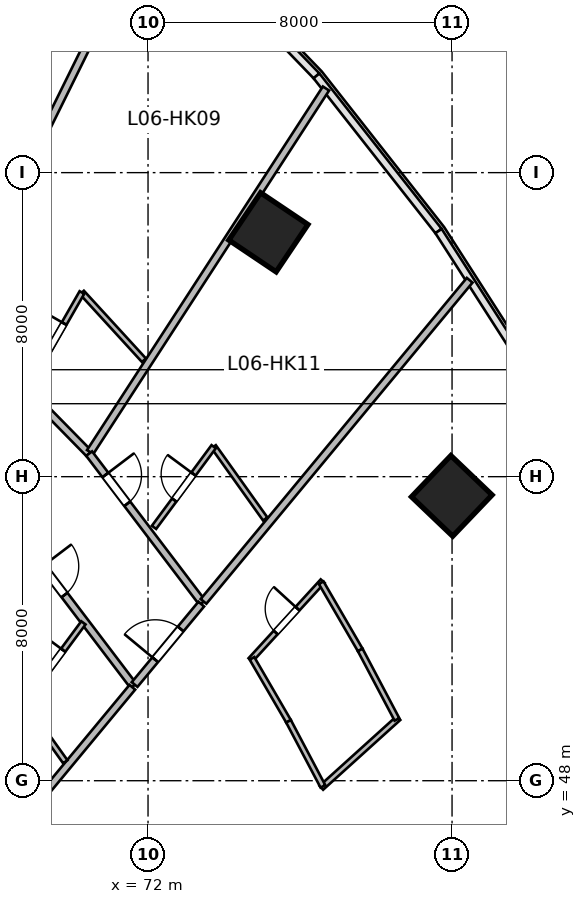
"""IFC4 building model, lengths in metres.
Left out: names, types, materials, properties, quantities, classifications, styles, units other than length and angle.
Written with IfcOpenShell. Run it as: python <this file> out.ifc"""

import sys

from ifc_helpers import new_model, si_unit, direction, frame, frame_2d, origin, origin_2d, place, context, subcontext, project, spatial, rectangle, extrude, source, transform, mapped, element, fill, save


model = new_model("IFC4")
c1 = context("Model", 3, precision=1e-05, world=origin(), true_north=direction((0.0, 1.0)))
c2 = subcontext(c1, "Body", "Model", "MODEL_VIEW")
j1 = project(units=[si_unit("LENGTHUNIT", "METRE"), si_unit("PLANEANGLEUNIT", "RADIAN")], contexts=[c1])
p1 = place(None, origin())
s1 = spatial("IfcSite", under=j1, at=p1, CompositionType="ELEMENT")
p2 = place(p1, origin())
s2 = spatial("IfcBuilding", under=s1, at=p2, CompositionType="ELEMENT")
p3 = place(p2, frame((0.0, 0.0, 35.4)))
s3 = spatial("IfcBuildingStorey", under=s2, at=p3, CompositionType="ELEMENT", Elevation=35.4)
m1 = source(origin(), c2, "Body", "SweptSolid", [
    extrude(rectangle(XDim=1.5, YDim=1.5, at=origin_2d()), origin(), (0.0, 0.0, 1.0), 3.6),
])
for number, where, z_axis, x_axis in (
    (1, (75.167, 62.43, 0.0), (0.0, 0.0, 1.0), (0.558, 0.83, 0.0)),
    (2, (79.993, 55.494, 0.0), (0.0, 0.0, 1.0), (0.691, 0.723, 0.0)),
):
    element("IfcColumn", number, at=place(p3, frame(where, z_axis=z_axis, x_axis=x_axis)), inside=s3, PredefinedType="COLUMN", context=c2, shape_type="MappedRepresentation", body=[
        mapped(m1, transform((0.0, 0.0, 0.0), scale=1.0)),
    ])
m2 = source(origin(), c2, "Body", "SweptSolid", [
    extrude(rectangle(XDim=11.77, YDim=0.195, at=frame_2d((5.885, 0.0))), origin(), (0.0, 0.0, 1.0), 3.36),
])
p4 = place(p3, frame((66.909, 60.282, 0.0), z_axis=(0.0, 0.0, 1.0), x_axis=(0.44286060326, 0.896590478468, 0.0)))
e3 = element("IfcWall", 3, at=p4, inside=s3, PredefinedType="PARTITIONING", context=c2, shape_type="MappedRepresentation", body=[
    mapped(m2, transform((0.0, 0.0, 0.0), scale=1.0)),
])
m3 = source(origin(), c2, "Body", "SweptSolid", [
    extrude(rectangle(XDim=5.087, YDim=0.195, at=frame_2d((2.543, 0.0))), origin(), (0.0, 0.0, 1.0), 3.36),
])
p5 = place(p3, frame((66.887, 60.238, 0.0), z_axis=(0.0, 0.0, 1.0), x_axis=(0.700428330775, -0.7137227427, 0.0)))
e4 = element("IfcWall", 4, at=p5, inside=s3, PredefinedType="PARTITIONING", context=c2, shape_type="MappedRepresentation", body=[
    mapped(m3, transform((0.0, 0.0, 0.0), scale=1.0)),
])
p6 = place(p5, frame((0.746, 0.0, 0.0)))
e5 = element("IfcOpeningElement", 5, at=p6, cuts=e4, PredefinedType="OPENING", context=c2, shape_type="SweptSolid", body=[
    extrude(rectangle(XDim=0.95, YDim=2.15, at=frame_2d((0.475, 1.075))), frame((0.0, 0.107, 0.0), z_axis=(0.0, -1.0, 0.0), x_axis=(1.0, 0.0, 0.0)), (0.0, 0.0, 1.0), 0.215),
])
m4 = source(origin(), c2, "Body", "SweptSolid", [
    extrude(rectangle(XDim=11.403, YDim=0.195, at=frame_2d((5.701, 0.0))), origin(), (0.0, 0.0, 1.0), 3.36),
])
p7 = place(p3, frame((70.477, 56.647, 0.0), z_axis=(0.0, 0.0, 1.0), x_axis=(0.544246090008, 0.838925618581, 0.0)))
e6 = element("IfcWall", 6, at=p7, inside=s3, PredefinedType="PARTITIONING", context=c2, shape_type="MappedRepresentation", body=[
    mapped(m4, transform((0.0, 0.0, 0.0), scale=1.0)),
])
m5 = source(origin(), c2, "Body", "SweptSolid", [
    extrude(rectangle(XDim=2.416, YDim=0.14, at=frame_2d((1.208, 0.0))), origin(), (0.0, 0.0, 1.0), 3.36),
])
p8 = place(p3, frame((70.26, 60.846, 0.0), z_axis=(0.0, 0.0, 1.0), x_axis=(0.675399637907, -0.737451916476, 0.0)))
e7 = element("IfcWall", 7, at=p8, inside=s3, PredefinedType="PARTITIONING", context=c2, shape_type="MappedRepresentation", body=[
    mapped(m5, transform((0.0, 0.0, 0.0), scale=1.0)),
])
m6 = source(origin(), c2, "Body", "SweptSolid", [
    extrude(rectangle(XDim=2.732, YDim=0.14, at=frame_2d((1.366, 0.0))), origin(), (0.0, 0.0, 1.0), 3.36),
])
p9 = place(p3, frame((68.902, 58.476, 0.0), z_axis=(0.0, 0.0, 1.0), x_axis=(0.497254966372, 0.867604459658, 0.0)))
e8 = element("IfcWall", 8, at=p9, inside=s3, PredefinedType="PARTITIONING", context=c2, shape_type="MappedRepresentation", body=[
    mapped(m6, transform((0.0, 0.0, 0.0), scale=1.0)),
])
p10 = place(p9, frame((0.941, 0.0, 0.0)))
e9 = element("IfcOpeningElement", 9, at=p10, cuts=e8, PredefinedType="OPENING", context=c2, shape_type="SweptSolid", body=[
    extrude(rectangle(XDim=0.85, YDim=2.05, at=frame_2d((0.425, 1.025))), frame((0.0, 0.08, 0.0), z_axis=(0.0, -1.0, 0.0), x_axis=(1.0, 0.0, 0.0)), (0.0, 0.0, 1.0), 0.16),
])
m7 = source(origin(), c2, "Body", "SweptSolid", [
    extrude(rectangle(XDim=4.928, YDim=0.195, at=frame_2d((2.464, 0.0))), origin(), (0.0, 0.0, 1.0), 3.36),
])
p11 = place(p3, frame((70.45, 56.607, 0.0), z_axis=(0.0, 0.0, 1.0), x_axis=(0.604793043708, -0.796382680803, 0.0)))
e10 = element("IfcWall", 10, at=p11, inside=s3, PredefinedType="PARTITIONING", context=c2, shape_type="MappedRepresentation", body=[
    mapped(m7, transform((0.0, 0.0, 0.0), scale=1.0)),
])
p12 = place(p11, frame((0.708, 0.0, 0.0)))
e11 = element("IfcOpeningElement", 11, at=p12, cuts=e10, PredefinedType="OPENING", context=c2, shape_type="SweptSolid", body=[
    extrude(rectangle(XDim=0.95, YDim=2.15, at=frame_2d((0.475, 1.075))), frame((0.0, 0.107, 0.0), z_axis=(0.0, -1.0, 0.0), x_axis=(1.0, 0.0, 0.0)), (0.0, 0.0, 1.0), 0.215),
])
m8 = source(origin(), c2, "Body", "SweptSolid", [
    extrude(rectangle(XDim=10.975, YDim=0.195, at=frame_2d((5.487, 0.0))), origin(), (0.0, 0.0, 1.0), 3.36),
])
p13 = place(p3, frame((73.46, 52.719, 0.0), z_axis=(0.0, 0.0, 1.0), x_axis=(0.638125265812, 0.769932558821, 0.0)))
e12 = element("IfcWall", 12, at=p13, inside=s3, PredefinedType="PARTITIONING", context=c2, shape_type="MappedRepresentation", body=[
    mapped(m8, transform((0.0, 0.0, 0.0), scale=1.0)),
])
m9 = source(origin(), c2, "Body", "SweptSolid", [
    extrude(rectangle(XDim=2.337, YDim=0.14, at=frame_2d((1.169, 0.0))), origin(), (0.0, 0.0, 1.0), 3.36),
])
p14 = place(p3, frame((73.727, 56.789, 0.0), z_axis=(0.0, 0.0, 1.0), x_axis=(0.580862665959, -0.814001574504, 0.0)))
e13 = element("IfcWall", 13, at=p14, inside=s3, PredefinedType="PARTITIONING", context=c2, shape_type="MappedRepresentation", body=[
    mapped(m9, transform((0.0, 0.0, 0.0), scale=1.0)),
])
m10 = source(origin(), c2, "Body", "SweptSolid", [
    extrude(rectangle(XDim=2.64, YDim=0.14, at=frame_2d((1.32, 0.0))), origin(), (0.0, 0.0, 1.0), 3.36),
])
p15 = place(p3, frame((72.157, 54.666, 0.0), z_axis=(0.0, 0.0, 1.0), x_axis=(0.594630255283, 0.803999290735, 0.0)))
e14 = element("IfcWall", 14, at=p15, inside=s3, PredefinedType="PARTITIONING", context=c2, shape_type="MappedRepresentation", body=[
    mapped(m10, transform((0.0, 0.0, 0.0), scale=1.0)),
])
p16 = place(p15, frame((0.895, 0.0, 0.0)))
e15 = element("IfcOpeningElement", 15, at=p16, cuts=e14, PredefinedType="OPENING", context=c2, shape_type="SweptSolid", body=[
    extrude(rectangle(XDim=0.85, YDim=2.05, at=frame_2d((0.425, 1.025))), frame((0.0, 0.08, 0.0), z_axis=(0.0, -1.0, 0.0), x_axis=(1.0, 0.0, 0.0)), (0.0, 0.0, 1.0), 0.16),
])
m11 = source(origin(), c2, "Body", "SweptSolid", [
    extrude(rectangle(XDim=4.576, YDim=0.195, at=frame_2d((2.288, 0.0))), origin(), (0.0, 0.0, 1.0), 3.36),
])
p17 = place(p3, frame((68.85, 54.139, 0.0), z_axis=(0.0, 0.0, 1.0), x_axis=(0.604795096156, -0.796381122118, 0.0)))
e16 = element("IfcWall", 16, at=p17, inside=s3, PredefinedType="PARTITIONING", context=c2, shape_type="MappedRepresentation", body=[
    mapped(m11, transform((0.0, 0.0, 0.0), scale=1.0)),
])
p18 = place(p17, frame((0.623, 0.0, 0.0)))
e17 = element("IfcOpeningElement", 17, at=p18, cuts=e16, PredefinedType="OPENING", context=c2, shape_type="SweptSolid", body=[
    extrude(rectangle(XDim=0.95, YDim=2.15, at=frame_2d((0.475, 1.075))), frame((0.0, 0.107, 0.0), z_axis=(0.0, -1.0, 0.0), x_axis=(1.0, 0.0, 0.0)), (0.0, 0.0, 1.0), 0.215),
])
m12 = source(origin(), c2, "Body", "SweptSolid", [
    extrude(rectangle(XDim=11.053, YDim=0.195, at=frame_2d((5.527, 0.0))), origin(), (0.0, 0.0, 1.0), 3.36),
])
p19 = place(p3, frame((64.534, 41.949, 0.0), z_axis=(0.0, 0.0, 1.0), x_axis=(0.638131235571, 0.769927611005, 0.0)))
e18 = element("IfcWall", 18, at=p19, inside=s3, PredefinedType="PARTITIONING", context=c2, shape_type="MappedRepresentation", body=[
    mapped(m12, transform((0.0, 0.0, 0.0), scale=1.0)),
])
m13 = source(origin(), c2, "Body", "SweptSolid", [
    extrude(rectangle(XDim=1.884, YDim=0.14, at=frame_2d((0.942, 0.0))), origin(), (0.0, 0.0, 1.0), 3.36),
])
p20 = place(p3, frame((68.729, 50.031, 0.0), z_axis=(0.0, 0.0, 1.0), x_axis=(0.580833492897, -0.814022391295, 0.0)))
e19 = element("IfcWall", 19, at=p20, inside=s3, PredefinedType="PARTITIONING", context=c2, shape_type="MappedRepresentation", body=[
    mapped(m13, transform((0.0, 0.0, 0.0), scale=1.0)),
])
p21 = place(p3, frame((68.729, 50.031, 0.0), z_axis=(0.0, 0.0, 1.0), x_axis=(0.594674469522, 0.803966588422, 0.0)))
e20 = element("IfcWall", 20, at=p21, inside=s3, PredefinedType="PARTITIONING", context=c2, shape_type="MappedRepresentation", body=[
    mapped(m10, transform((0.0, 0.0, 0.0), scale=1.0)),
])
p22 = place(p21, frame((0.895, 0.0, 0.0)))
e21 = element("IfcOpeningElement", 21, at=p22, cuts=e20, PredefinedType="OPENING", context=c2, shape_type="SweptSolid", body=[
    extrude(rectangle(XDim=0.85, YDim=2.05, at=frame_2d((0.425, 1.025))), frame((0.0, 0.08, 0.0), z_axis=(0.0, -1.0, 0.0), x_axis=(1.0, 0.0, 0.0)), (0.0, 0.0, 1.0), 0.16),
])
m14 = source(origin(), c2, "Body", "SweptSolid", [
    extrude(rectangle(XDim=2.748, YDim=0.195, at=frame_2d((1.374, 0.0))), origin(), (0.0, 0.0, 1.0), 3.36),
])
p23 = place(p3, frame((71.647, 50.531, 0.0), z_axis=(0.0, 0.0, 1.0), x_axis=(0.638111168284, 0.769944242729, 0.0)))
e22 = element("IfcWall", 22, at=p23, inside=s3, PredefinedType="PARTITIONING", context=c2, shape_type="MappedRepresentation", body=[
    mapped(m14, transform((0.0, 0.0, 0.0), scale=1.0)),
])
p24 = place(p23, frame((0.849, 0.0, 0.0)))
e23 = element("IfcOpeningElement", 23, at=p24, cuts=e22, PredefinedType="OPENING", context=c2, shape_type="SweptSolid", body=[
    extrude(rectangle(XDim=1.05, YDim=2.15, at=frame_2d((0.525, 1.075))), frame((0.0, 0.107, 0.0), z_axis=(0.0, -1.0, 0.0), x_axis=(1.0, 0.0, 0.0)), (0.0, 0.0, 1.0), 0.215),
])
m15 = source(origin(), c2, "Body", "SweptSolid", [
    extrude(rectangle(XDim=2.812, YDim=0.14, at=frame_2d((1.406, 0.0))), origin(), (0.0, 0.0, 1.0), 3.36),
])
p25 = place(p3, frame((74.697, 51.177, 0.0), z_axis=(0.0, 0.0, 1.0), x_axis=(0.675119025852, 0.737708818527, 0.0)))
e24 = element("IfcWall", 24, at=p25, inside=s3, PredefinedType="PARTITIONING", context=c2, shape_type="MappedRepresentation", body=[
    mapped(m15, transform((0.0, 0.0, 0.0), scale=1.0)),
])
p26 = place(p25, frame((0.981, 0.0, 0.0)))
e25 = element("IfcOpeningElement", 25, at=p26, cuts=e24, PredefinedType="OPENING", context=c2, shape_type="SweptSolid", body=[
    extrude(rectangle(XDim=0.85, YDim=2.05, at=frame_2d((0.425, 1.025))), frame((0.0, 0.08, 0.0), z_axis=(0.0, -1.0, 0.0), x_axis=(1.0, 0.0, 0.0)), (0.0, 0.0, 1.0), 0.16),
])
m16 = source(origin(), c2, "Body", "SweptSolid", [
    extrude(rectangle(XDim=2.738, YDim=0.14, at=frame_2d((1.369, 0.0))), origin(), (0.0, 0.0, 1.0), 3.36),
])
p27 = place(p3, frame((76.56, 47.814, 0.0), z_axis=(0.0, 0.0, 1.0), x_axis=(0.741873676582, 0.670539669218, 0.0)))
e26 = element("IfcWall", 26, at=p27, inside=s3, PredefinedType="PARTITIONING", context=c2, shape_type="MappedRepresentation", body=[
    mapped(m16, transform((0.0, 0.0, 0.0), scale=1.0)),
])
m17 = source(origin(), c2, "Body", "SweptSolid", [
    extrude(rectangle(XDim=1.914, YDim=0.14, at=frame_2d((0.957, 0.0))), origin(), (0.0, 0.0, 1.0), 3.36),
])
p28 = place(p3, frame((74.736, 51.219, 0.0), z_axis=(0.0, 0.0, 1.0), x_axis=(0.502347790612, -0.864665656347, 0.0)))
e27 = element("IfcWall", 27, at=p28, inside=s3, PredefinedType="PARTITIONING", context=c2, shape_type="MappedRepresentation", body=[
    mapped(m17, transform((0.0, 0.0, 0.0), scale=1.0)),
])
m18 = source(origin(), c2, "Body", "SweptSolid", [
    extrude(rectangle(XDim=2.045, YDim=0.14, at=frame_2d((1.022, 0.0))), origin(), (0.0, 0.0, 1.0), 3.36),
])
p29 = place(p3, frame((76.557, 53.209, 0.0), z_axis=(0.0, 0.0, 1.0), x_axis=(0.5023112139, -0.864686905411, 0.0)))
e28 = element("IfcWall", 28, at=p29, inside=s3, PredefinedType="PARTITIONING", context=c2, shape_type="MappedRepresentation", body=[
    mapped(m18, transform((0.0, 0.0, 0.0), scale=1.0)),
])
m19 = source(origin(), c2, "Body", "SweptSolid", [
    extrude(rectangle(XDim=1.936, YDim=0.14, at=frame_2d((0.968, 0.0))), origin(), (0.0, 0.0, 1.0), 3.36),
])
p30 = place(p3, frame((75.697, 49.563, 0.0), z_axis=(0.0, 0.0, 1.0), x_axis=(0.467174971862, -0.884164886017, 0.0)))
e29 = element("IfcWall", 29, at=p30, inside=s3, PredefinedType="PARTITIONING", context=c2, shape_type="MappedRepresentation", body=[
    mapped(m19, transform((0.0, 0.0, 0.0), scale=1.0)),
])
m20 = source(origin(), c2, "Body", "SweptSolid", [
    extrude(rectangle(XDim=2.068, YDim=0.14, at=frame_2d((1.034, 0.0))), origin(), (0.0, 0.0, 1.0), 3.36),
])
p31 = place(p3, frame((77.584, 51.441, 0.0), z_axis=(0.0, 0.0, 1.0), x_axis=(0.467215057643, -0.884143704333, 0.0)))
e30 = element("IfcWall", 30, at=p31, inside=s3, PredefinedType="PARTITIONING", context=c2, shape_type="MappedRepresentation", body=[
    mapped(m20, transform((0.0, 0.0, 0.0), scale=1.0)),
])
m21 = source(origin(), c2, "Body", "SweptSolid", [
    extrude(rectangle(XDim=0.85, YDim=2.05, at=frame_2d((0.425, 1.025))), frame((0.0, 0.025, 0.0), z_axis=(0.0, -1.0, 0.0), x_axis=(1.0, 0.0, 0.0)), (0.0, 0.0, 1.0), 0.05),
])
p32 = place(p10, origin())
e31 = element("IfcDoor", 31, at=p32, inside=s3, OperationType="SINGLE_SWING_RIGHT", PredefinedType="DOOR", context=c2, shape_type="MappedRepresentation", body=[
    mapped(m21, transform((0.0, 0.0, 0.0), scale=1.0)),
])
fill(e9, e31)
m22 = source(origin(), c2, "Body", "SweptSolid", [
    extrude(rectangle(XDim=0.95, YDim=2.15, at=frame_2d((0.475, 1.075))), frame((0.0, 0.025, 0.0), z_axis=(0.0, -1.0, 0.0), x_axis=(1.0, 0.0, 0.0)), (0.0, 0.0, 1.0), 0.05),
])
p33 = place(p12, origin())
e32 = element("IfcDoor", 32, at=p33, inside=s3, OperationType="SINGLE_SWING_LEFT", PredefinedType="DOOR", context=c2, shape_type="MappedRepresentation", body=[
    mapped(m22, transform((0.0, 0.0, 0.0), scale=1.0)),
])
fill(e11, e32)
p34 = place(p16, origin())
e33 = element("IfcDoor", 33, at=p34, inside=s3, OperationType="SINGLE_SWING_RIGHT", PredefinedType="DOOR", context=c2, shape_type="MappedRepresentation", body=[
    mapped(m21, transform((0.0, 0.0, 0.0), scale=1.0)),
])
fill(e15, e33)
p35 = place(p18, origin())
e34 = element("IfcDoor", 34, at=p35, inside=s3, OperationType="SINGLE_SWING_LEFT", PredefinedType="DOOR", context=c2, shape_type="MappedRepresentation", body=[
    mapped(m22, transform((0.0, 0.0, 0.0), scale=1.0)),
])
fill(e17, e34)
p36 = place(p22, origin())
e35 = element("IfcDoor", 35, at=p36, inside=s3, OperationType="SINGLE_SWING_RIGHT", PredefinedType="DOOR", context=c2, shape_type="MappedRepresentation", body=[
    mapped(m21, transform((0.0, 0.0, 0.0), scale=1.0)),
])
fill(e21, e35)
m23 = source(origin(), c2, "Body", "SweptSolid", [
    extrude(rectangle(XDim=1.05, YDim=2.15, at=frame_2d((0.525, 1.075))), frame((0.0, 0.025, 0.0), z_axis=(0.0, -1.0, 0.0), x_axis=(1.0, 0.0, 0.0)), (0.0, 0.0, 1.0), 0.05),
])
p37 = place(p24, origin())
e36 = element("IfcDoor", 36, at=p37, inside=s3, OperationType="SINGLE_SWING_LEFT", PredefinedType="DOOR", context=c2, shape_type="MappedRepresentation", body=[
    mapped(m23, transform((0.0, 0.0, 0.0), scale=1.0)),
])
fill(e23, e36)
p38 = place(p26, origin())
e37 = element("IfcDoor", 37, at=p38, inside=s3, OperationType="SINGLE_SWING_RIGHT", PredefinedType="DOOR", context=c2, shape_type="MappedRepresentation", body=[
    mapped(m21, transform((0.0, 0.0, 0.0), scale=1.0)),
])
fill(e25, e37)
save(model, sys.argv[1])
